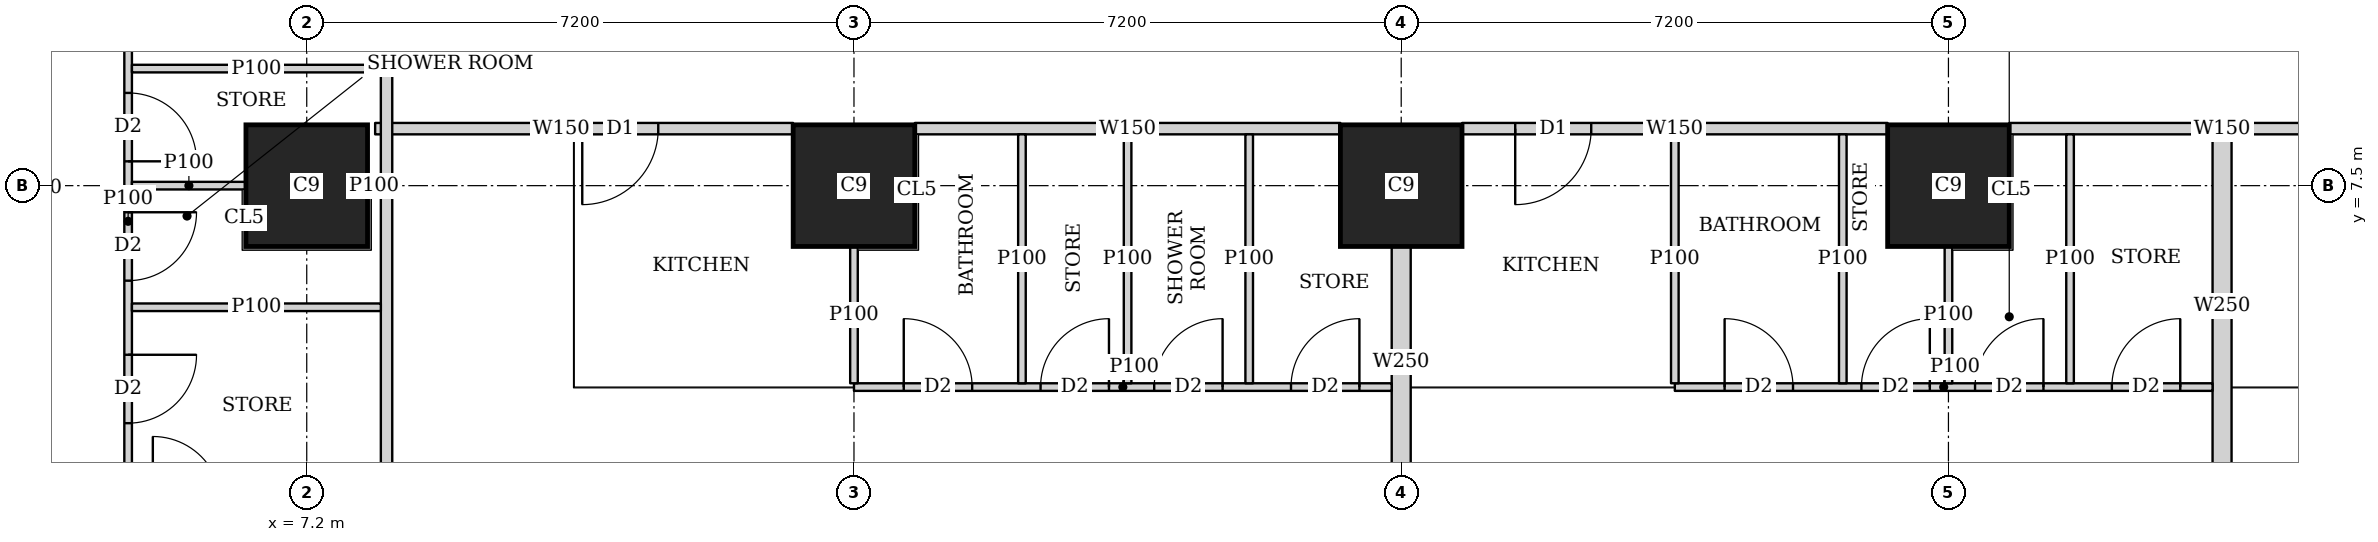
"""IFC4 building model, lengths in metres.
Left out: names, types, materials, properties, quantities, classifications, styles, units other than length and angle.
Written with IfcOpenShell. Run it as: python <this file> out.ifc"""

import sys

from ifc_helpers import new_model, si_unit, direction, frame, frame_2d, origin, origin_2d, place, context, subcontext, project, spatial, rectangle, extrude, element, fill, save


model = new_model("IFC4")
c1 = context("Model", 3, precision=1e-05, world=origin(), true_north=direction((0.0, 1.0)))
c2 = subcontext(c1, "Body", "Model", "MODEL_VIEW")
j1 = project(units=[si_unit("LENGTHUNIT", "METRE"), si_unit("PLANEANGLEUNIT", "RADIAN")], contexts=[c1])
p1 = place(None, origin())
s1 = spatial("IfcSite", under=j1, at=p1, CompositionType="ELEMENT")
p2 = place(p1, origin())
s2 = spatial("IfcBuilding", under=s1, at=p2, CompositionType="ELEMENT")
p3 = place(p2, frame((0.0, 0.0, 100.4)))
s3 = spatial("IfcBuildingStorey", under=s2, at=p3, CompositionType="ELEMENT", Elevation=100.4)
for number, where, z_axis, x_axis in (
    (1, (7.2, 7.5, 0.0), (0.0, 0.0, 1.0), (1.0, 0.0, 0.0)),
    (2, (14.4, 7.5, 0.0), (0.0, 0.0, 1.0), (1.0, 0.0, 0.0)),
    (3, (21.6, 7.5, 0.0), (0.0, 0.0, 1.0), (1.0, 0.0, 0.0)),
    (4, (28.8, 7.5, 0.0), (0.0, 0.0, 1.0), (1.0, 0.0, 0.0)),
):
    element("IfcColumn", number, at=place(p3, frame(where, z_axis=z_axis, x_axis=x_axis)), inside=s3, PredefinedType="COLUMN", context=c2, shape_type="SweptSolid", body=[
        extrude(rectangle(XDim=1.6, YDim=1.6, at=origin_2d()), origin(), (0.0, 0.0, 1.0), 3.75),
    ])
p4 = place(p3, frame((8.25, 2.126, 0.0), z_axis=(0.0, 0.0, 1.0), x_axis=(0.0, 1.0, 0.0)))
e5 = element("IfcWall", 5, at=p4, inside=s3, PredefinedType="SOLIDWALL", context=c2, shape_type="SweptSolid", body=[
    extrude(rectangle(XDim=40.773, YDim=0.15, at=frame_2d((20.386, 0.0))), origin(), (0.0, 0.0, 1.0), 3.5),
])
p5 = place(p4, frame((10.286, 0.0, 0.0)))
e6 = element("IfcOpeningElement", 6, at=p5, cuts=e5, PredefinedType="OPENING", context=c2, shape_type="SweptSolid", body=[
    extrude(rectangle(XDim=1.0, YDim=2.1, at=frame_2d((0.5, 1.05))), frame((0.0, 0.085, 0.0), z_axis=(0.0, -1.0, 0.0), x_axis=(1.0, 0.0, 0.0)), (0.0, 0.0, 1.0), 0.17),
])
p6 = place(p4, frame((14.461, 0.0, 0.0)))
e7 = element("IfcOpeningElement", 7, at=p6, cuts=e5, PredefinedType="OPENING", context=c2, shape_type="SweptSolid", body=[
    extrude(rectangle(XDim=1.0, YDim=2.1, at=frame_2d((0.5, 1.05))), frame((0.0, 0.085, 0.0), z_axis=(0.0, -1.0, 0.0), x_axis=(1.0, 0.0, 0.0)), (0.0, 0.0, 1.0), 0.17),
])
p7 = place(p4, frame((25.287, 0.0, 0.0)))
e8 = element("IfcOpeningElement", 8, at=p7, cuts=e5, PredefinedType="OPENING", context=c2, shape_type="SweptSolid", body=[
    extrude(rectangle(XDim=1.0, YDim=2.1, at=frame_2d((0.5, 1.05))), frame((0.0, 0.085, 0.0), z_axis=(0.0, -1.0, 0.0), x_axis=(1.0, 0.0, 0.0)), (0.0, 0.0, 1.0), 0.17),
])
p8 = place(p4, frame((32.787, 0.0, 0.0)))
e9 = element("IfcOpeningElement", 9, at=p8, cuts=e5, PredefinedType="OPENING", context=c2, shape_type="SweptSolid", body=[
    extrude(rectangle(XDim=1.0, YDim=2.1, at=frame_2d((0.5, 1.05))), frame((0.0, 0.085, 0.0), z_axis=(0.0, -1.0, 0.0), x_axis=(1.0, 0.0, 0.0)), (0.0, 0.0, 1.0), 0.17),
])
p9 = place(p3, frame((35.199, 8.25, 0.0), z_axis=(0.0, 0.0, 1.0), x_axis=(-1.0, 0.0, 0.0)))
e10 = element("IfcWall", 10, at=p9, inside=s3, PredefinedType="SOLIDWALL", context=c2, shape_type="SweptSolid", body=[
    extrude(rectangle(XDim=5.598, YDim=0.15, at=frame_2d((2.799, 0.0))), origin(), (0.0, 0.0, 1.0), 3.5),
])
p10 = place(p9, frame((0.699, 0.0, 0.0)))
e11 = element("IfcOpeningElement", 11, at=p10, cuts=e10, PredefinedType="OPENING", context=c2, shape_type="SweptSolid", body=[
    extrude(rectangle(XDim=1.0, YDim=2.1, at=frame_2d((0.5, 1.05))), frame((0.0, 0.085, 0.0), z_axis=(0.0, -1.0, 0.0), x_axis=(1.0, 0.0, 0.0)), (0.0, 0.0, 1.0), 0.17),
])
p11 = place(p3, frame((27.999, 8.25, 0.0), z_axis=(0.0, 0.0, 1.0), x_axis=(-1.0, 0.0, 0.0)))
e12 = element("IfcWall", 12, at=p11, inside=s3, PredefinedType="SOLIDWALL", context=c2, shape_type="SweptSolid", body=[
    extrude(rectangle(XDim=5.598, YDim=0.15, at=frame_2d((2.799, 0.0))), origin(), (0.0, 0.0, 1.0), 3.5),
])
p12 = place(p11, frame((3.899, 0.0, 0.0)))
e13 = element("IfcOpeningElement", 13, at=p12, cuts=e12, PredefinedType="OPENING", context=c2, shape_type="SweptSolid", body=[
    extrude(rectangle(XDim=1.0, YDim=2.1, at=frame_2d((0.5, 1.05))), frame((0.0, 0.085, 0.0), z_axis=(0.0, -1.0, 0.0), x_axis=(1.0, 0.0, 0.0)), (0.0, 0.0, 1.0), 0.17),
])
p13 = place(p3, frame((20.799, 8.25, 0.0), z_axis=(0.0, 0.0, 1.0), x_axis=(-1.0, 0.0, 0.0)))
e14 = element("IfcWall", 14, at=p13, inside=s3, PredefinedType="SOLIDWALL", context=c2, shape_type="SweptSolid", body=[
    extrude(rectangle(XDim=5.598, YDim=0.15, at=frame_2d((2.799, 0.0))), origin(), (0.0, 0.0, 1.0), 3.5),
])
p14 = place(p3, frame((13.599, 8.25, 0.0), z_axis=(0.0, 0.0, 1.0), x_axis=(-1.0, 0.0, 0.0)))
e15 = element("IfcWall", 15, at=p14, inside=s3, PredefinedType="SOLIDWALL", context=c2, shape_type="SweptSolid", body=[
    extrude(rectangle(XDim=5.499, YDim=0.15, at=frame_2d((2.75, 0.0))), origin(), (0.0, 0.0, 1.0), 3.5),
])
p15 = place(p14, frame((1.774, 0.0, 0.0)))
e16 = element("IfcOpeningElement", 16, at=p15, cuts=e15, PredefinedType="OPENING", context=c2, shape_type="SweptSolid", body=[
    extrude(rectangle(XDim=1.0, YDim=2.1, at=frame_2d((0.5, 1.05))), frame((0.0, 0.085, 0.0), z_axis=(0.0, -1.0, 0.0), x_axis=(1.0, 0.0, 0.0)), (0.0, 0.0, 1.0), 0.17),
])
p16 = place(p3, frame((33.382, 45.65, 0.0), z_axis=(0.0, 0.0, 1.0), x_axis=(0.185593544777, -0.982626600565, 0.0)))
e17 = element("IfcWall", 17, at=p16, inside=s3, PredefinedType="SOLIDWALL", context=c2, shape_type="SweptSolid", body=[
    extrude(rectangle(XDim=47.118, YDim=0.15, at=frame_2d((23.559, 0.0))), origin(), (0.0, 0.0, 1.0), 2.2),
])
p17 = place(p16, frame((10.662, 0.0, 0.0)))
e18 = element("IfcOpeningElement", 18, at=p17, cuts=e17, PredefinedType="OPENING", context=c2, shape_type="SweptSolid", body=[
    extrude(rectangle(XDim=1.0, YDim=2.1, at=frame_2d((0.5, 1.05))), frame((0.0, 0.085, 0.0), z_axis=(0.0, -1.0, 0.0), x_axis=(1.0, 0.0, 0.0)), (0.0, 0.0, 1.0), 0.17),
])
p18 = place(p16, frame((15.237, 0.0, 0.0)))
e19 = element("IfcOpeningElement", 19, at=p18, cuts=e17, PredefinedType="OPENING", context=c2, shape_type="SweptSolid", body=[
    extrude(rectangle(XDim=1.0, YDim=2.1, at=frame_2d((0.5, 1.05))), frame((0.0, 0.085, 0.0), z_axis=(0.0, -1.0, 0.0), x_axis=(1.0, 0.0, 0.0)), (0.0, 0.0, 1.0), 0.17),
])
p19 = place(p16, frame((27.341, 0.0, 0.0)))
e20 = element("IfcOpeningElement", 20, at=p19, cuts=e17, PredefinedType="OPENING", context=c2, shape_type="SweptSolid", body=[
    extrude(rectangle(XDim=1.0, YDim=2.1, at=frame_2d((0.5, 1.05))), frame((0.0, 0.085, 0.0), z_axis=(0.0, -1.0, 0.0), x_axis=(1.0, 0.0, 0.0)), (0.0, 0.0, 1.0), 0.17),
])
p20 = place(p16, frame((33.833, 0.0, 0.0)))
e21 = element("IfcOpeningElement", 21, at=p20, cuts=e17, PredefinedType="OPENING", context=c2, shape_type="SweptSolid", body=[
    extrude(rectangle(XDim=1.0, YDim=2.1, at=frame_2d((0.5, 1.05))), frame((0.0, 0.085, 0.0), z_axis=(0.0, -1.0, 0.0), x_axis=(1.0, 0.0, 0.0)), (0.0, 0.0, 1.0), 0.17),
])
p21 = place(p3, frame((4.85, 2.812, 0.0), z_axis=(0.0, 0.0, 1.0), x_axis=(0.0, 1.0, 0.0)))
e22 = element("IfcWall", 22, at=p21, inside=s3, PredefinedType="PARTITIONING", context=c2, shape_type="SweptSolid", body=[
    extrude(rectangle(XDim=8.438, YDim=0.1, at=frame_2d((4.219, 0.0))), origin(), (0.0, 0.0, 1.0), 3.5),
])
p22 = place(p21, frame((6.883, 0.0, 0.0)))
e23 = element("IfcOpeningElement", 23, at=p22, cuts=e22, PredefinedType="OPENING", context=c2, shape_type="SweptSolid", body=[
    extrude(rectangle(XDim=0.9, YDim=2.1, at=frame_2d((0.45, 1.05))), frame((0.0, 0.06, 0.0), z_axis=(0.0, -1.0, 0.0), x_axis=(1.0, 0.0, 0.0)), (0.0, 0.0, 1.0), 0.12),
])
p23 = place(p21, frame((3.438, 0.0, 0.0)))
e24 = element("IfcOpeningElement", 24, at=p23, cuts=e22, PredefinedType="OPENING", context=c2, shape_type="SweptSolid", body=[
    extrude(rectangle(XDim=0.9, YDim=2.1, at=frame_2d((0.45, 1.05))), frame((0.0, 0.06, 0.0), z_axis=(0.0, -1.0, 0.0), x_axis=(1.0, 0.0, 0.0)), (0.0, 0.0, 1.0), 0.12),
])
p24 = place(p21, frame((5.008, 0.0, 0.0)))
e25 = element("IfcOpeningElement", 25, at=p24, cuts=e22, PredefinedType="OPENING", context=c2, shape_type="SweptSolid", body=[
    extrude(rectangle(XDim=0.9, YDim=2.1, at=frame_2d((0.45, 1.05))), frame((0.0, 0.06, 0.0), z_axis=(0.0, -1.0, 0.0), x_axis=(1.0, 0.0, 0.0)), (0.0, 0.0, 1.0), 0.12),
])
p25 = place(p21, frame((1.563, 0.0, 0.0)))
e26 = element("IfcOpeningElement", 26, at=p25, cuts=e22, PredefinedType="OPENING", context=c2, shape_type="SweptSolid", body=[
    extrude(rectangle(XDim=0.9, YDim=2.1, at=frame_2d((0.45, 1.05))), frame((0.0, 0.06, 0.0), z_axis=(0.0, -1.0, 0.0), x_axis=(1.0, 0.0, 0.0)), (0.0, 0.0, 1.0), 0.12),
])
p26 = place(p3, frame((4.9, 7.5, 0.0), z_axis=(0.0, 0.0, 1.0), x_axis=(1.0, 0.0, 0.0)))
e27 = element("IfcWall", 27, at=p26, inside=s3, PredefinedType="PARTITIONING", context=c2, shape_type="SweptSolid", body=[
    extrude(rectangle(XDim=1.499, YDim=0.1, at=frame_2d((0.75, 0.0))), origin(), (0.0, 0.0, 1.0), 3.5),
])
p27 = place(p3, frame((8.001, 7.5, 0.0), z_axis=(0.0, 0.0, 1.0), x_axis=(1.0, 0.0, 0.0)))
e28 = element("IfcWall", 28, at=p27, inside=s3, PredefinedType="PARTITIONING", context=c2, shape_type="SweptSolid", body=[
    extrude(rectangle(XDim=0.174, YDim=0.1, at=frame_2d((0.087, 0.0))), origin(), (0.0, 0.0, 1.0), 3.5),
])
for number, where, z_axis, x_axis in (
    (29, (4.9, 9.04, 0.0), (0.0, 0.0, 1.0), (1.0, 0.0, 0.0)),
    (30, (4.9, 5.9, 0.0), (0.0, 0.0, 1.0), (1.0, 0.0, 0.0)),
):
    element("IfcWall", number, at=place(p3, frame(where, z_axis=z_axis, x_axis=x_axis)), inside=s3, PredefinedType="PARTITIONING", context=c2, shape_type="SweptSolid", body=[
        extrude(rectangle(XDim=3.275, YDim=0.1, at=frame_2d((1.638, 0.0))), origin(), (0.0, 0.0, 1.0), 3.5),
    ])
p28 = place(p3, frame((21.475, 4.85, 0.0), z_axis=(0.0, 0.0, 1.0), x_axis=(-1.0, 0.0, 0.0)))
e31 = element("IfcWall", 31, at=p28, inside=s3, PredefinedType="PARTITIONING", context=c2, shape_type="SweptSolid", body=[
    extrude(rectangle(XDim=7.075, YDim=0.1, at=frame_2d((3.538, 0.0))), origin(), (0.0, 0.0, 1.0), 3.5),
])
p29 = place(p28, frame((5.52, 0.0, 0.0)))
e32 = element("IfcOpeningElement", 32, at=p29, cuts=e31, PredefinedType="OPENING", context=c2, shape_type="SweptSolid", body=[
    extrude(rectangle(XDim=0.9, YDim=2.1, at=frame_2d((0.45, 1.05))), frame((0.0, 0.06, 0.0), z_axis=(0.0, -1.0, 0.0), x_axis=(1.0, 0.0, 0.0)), (0.0, 0.0, 1.0), 0.12),
])
p30 = place(p28, frame((2.225, 0.0, 0.0)))
e33 = element("IfcOpeningElement", 33, at=p30, cuts=e31, PredefinedType="OPENING", context=c2, shape_type="SweptSolid", body=[
    extrude(rectangle(XDim=0.9, YDim=2.1, at=frame_2d((0.45, 1.05))), frame((0.0, 0.06, 0.0), z_axis=(0.0, -1.0, 0.0), x_axis=(1.0, 0.0, 0.0)), (0.0, 0.0, 1.0), 0.12),
])
p31 = place(p28, frame((3.72, 0.0, 0.0)))
e34 = element("IfcOpeningElement", 34, at=p31, cuts=e31, PredefinedType="OPENING", context=c2, shape_type="SweptSolid", body=[
    extrude(rectangle(XDim=0.9, YDim=2.1, at=frame_2d((0.45, 1.05))), frame((0.0, 0.06, 0.0), z_axis=(0.0, -1.0, 0.0), x_axis=(1.0, 0.0, 0.0)), (0.0, 0.0, 1.0), 0.12),
])
p32 = place(p28, frame((0.425, 0.0, 0.0)))
e35 = element("IfcOpeningElement", 35, at=p32, cuts=e31, PredefinedType="OPENING", context=c2, shape_type="SweptSolid", body=[
    extrude(rectangle(XDim=0.9, YDim=2.1, at=frame_2d((0.45, 1.05))), frame((0.0, 0.06, 0.0), z_axis=(0.0, -1.0, 0.0), x_axis=(1.0, 0.0, 0.0)), (0.0, 0.0, 1.0), 0.12),
])
p33 = place(p3, frame((14.4, 4.9, 0.0), z_axis=(0.0, 0.0, 1.0), x_axis=(0.0, 1.0, 0.0)))
e36 = element("IfcWall", 36, at=p33, inside=s3, PredefinedType="PARTITIONING", context=c2, shape_type="SweptSolid", body=[
    extrude(rectangle(XDim=1.799, YDim=0.1, at=frame_2d((0.899, 0.0))), origin(), (0.0, 0.0, 1.0), 3.5),
])
for number, where, z_axis, x_axis in (
    (37, (18.0, 4.9, 0.0), (0.0, 0.0, 1.0), (0.0, 1.0, 0.0)),
    (38, (16.61, 4.9, 0.0), (0.0, 0.0, 1.0), (0.0, 1.0, 0.0)),
    (39, (19.6, 4.9, 0.0), (0.0, 0.0, 1.0), (0.0, 1.0, 0.0)),
):
    element("IfcWall", number, at=place(p3, frame(where, z_axis=z_axis, x_axis=x_axis)), inside=s3, PredefinedType="PARTITIONING", context=c2, shape_type="SweptSolid", body=[
        extrude(rectangle(XDim=3.275, YDim=0.1, at=frame_2d((1.638, 0.0))), origin(), (0.0, 0.0, 1.0), 3.5),
    ])
p34 = place(p3, frame((32.275, 4.85, 0.0), z_axis=(0.0, 0.0, 1.0), x_axis=(-1.0, 0.0, 0.0)))
e40 = element("IfcWall", 40, at=p34, inside=s3, PredefinedType="PARTITIONING", context=c2, shape_type="SweptSolid", body=[
    extrude(rectangle(XDim=7.075, YDim=0.1, at=frame_2d((3.538, 0.0))), origin(), (0.0, 0.0, 1.0), 3.5),
])
p35 = place(p34, frame((5.52, 0.0, 0.0)))
e41 = element("IfcOpeningElement", 41, at=p35, cuts=e40, PredefinedType="OPENING", context=c2, shape_type="SweptSolid", body=[
    extrude(rectangle(XDim=0.9, YDim=2.1, at=frame_2d((0.45, 1.05))), frame((0.0, 0.06, 0.0), z_axis=(0.0, -1.0, 0.0), x_axis=(1.0, 0.0, 0.0)), (0.0, 0.0, 1.0), 0.12),
])
p36 = place(p34, frame((2.225, 0.0, 0.0)))
e42 = element("IfcOpeningElement", 42, at=p36, cuts=e40, PredefinedType="OPENING", context=c2, shape_type="SweptSolid", body=[
    extrude(rectangle(XDim=0.9, YDim=2.1, at=frame_2d((0.45, 1.05))), frame((0.0, 0.06, 0.0), z_axis=(0.0, -1.0, 0.0), x_axis=(1.0, 0.0, 0.0)), (0.0, 0.0, 1.0), 0.12),
])
p37 = place(p34, frame((3.72, 0.0, 0.0)))
e43 = element("IfcOpeningElement", 43, at=p37, cuts=e40, PredefinedType="OPENING", context=c2, shape_type="SweptSolid", body=[
    extrude(rectangle(XDim=0.9, YDim=2.1, at=frame_2d((0.45, 1.05))), frame((0.0, 0.06, 0.0), z_axis=(0.0, -1.0, 0.0), x_axis=(1.0, 0.0, 0.0)), (0.0, 0.0, 1.0), 0.12),
])
p38 = place(p34, frame((0.425, 0.0, 0.0)))
e44 = element("IfcOpeningElement", 44, at=p38, cuts=e40, PredefinedType="OPENING", context=c2, shape_type="SweptSolid", body=[
    extrude(rectangle(XDim=0.9, YDim=2.1, at=frame_2d((0.45, 1.05))), frame((0.0, 0.06, 0.0), z_axis=(0.0, -1.0, 0.0), x_axis=(1.0, 0.0, 0.0)), (0.0, 0.0, 1.0), 0.12),
])
p39 = place(p3, frame((25.2, 4.9, 0.0), z_axis=(0.0, 0.0, 1.0), x_axis=(0.0, 1.0, 0.0)))
e45 = element("IfcWall", 45, at=p39, inside=s3, PredefinedType="PARTITIONING", context=c2, shape_type="SweptSolid", body=[
    extrude(rectangle(XDim=3.275, YDim=0.1, at=frame_2d((1.638, 0.0))), origin(), (0.0, 0.0, 1.0), 3.5),
])
p40 = place(p3, frame((28.8, 4.9, 0.0), z_axis=(0.0, 0.0, 1.0), x_axis=(0.0, 1.0, 0.0)))
e46 = element("IfcWall", 46, at=p40, inside=s3, PredefinedType="PARTITIONING", context=c2, shape_type="SweptSolid", body=[
    extrude(rectangle(XDim=1.799, YDim=0.1, at=frame_2d((0.899, 0.0))), origin(), (0.0, 0.0, 1.0), 3.5),
])
for number, where, z_axis, x_axis in (
    (47, (27.41, 4.9, 0.0), (0.0, 0.0, 1.0), (0.0, 1.0, 0.0)),
    (48, (30.4, 4.9, 0.0), (0.0, 0.0, 1.0), (0.0, 1.0, 0.0)),
):
    element("IfcWall", number, at=place(p3, frame(where, z_axis=z_axis, x_axis=x_axis)), inside=s3, PredefinedType="PARTITIONING", context=c2, shape_type="SweptSolid", body=[
        extrude(rectangle(XDim=3.275, YDim=0.1, at=frame_2d((1.638, 0.0))), origin(), (0.0, 0.0, 1.0), 3.5),
    ])
p41 = place(p3, frame((21.6, 3.65, 0.0), z_axis=(0.0, 0.0, 1.0), x_axis=(0.0, 1.0, 0.0)))
e49 = element("IfcWall", 49, at=p41, inside=s3, PredefinedType="SOLIDWALL", context=c2, shape_type="SweptSolid", body=[
    extrude(rectangle(XDim=3.049, YDim=0.25, at=frame_2d((1.524, 0.0))), origin(), (0.0, 0.0, 1.0), 3.5),
])
p42 = place(p3, frame((32.4, 3.65, 0.0), z_axis=(0.0, 0.0, 1.0), x_axis=(0.0, 1.0, 0.0)))
e50 = element("IfcWall", 50, at=p42, inside=s3, PredefinedType="SOLIDWALL", context=c2, shape_type="SweptSolid", body=[
    extrude(rectangle(XDim=4.525, YDim=0.25, at=frame_2d((2.263, 0.0))), origin(), (0.0, 0.0, 1.0), 3.5),
])
p43 = place(p23, origin())
e51 = element("IfcDoor", 51, at=p43, inside=s3, OperationType="SINGLE_SWING_LEFT", PredefinedType="DOOR", context=c2, shape_type="SweptSolid", body=[
    extrude(rectangle(XDim=0.9, YDim=2.1, at=frame_2d((0.45, 1.05))), frame((0.0, 0.025, 0.0), z_axis=(0.0, -1.0, 0.0), x_axis=(1.0, 0.0, 0.0)), (0.0, 0.0, 1.0), 0.05),
])
fill(e24, e51)
p44 = place(p24, origin())
e52 = element("IfcDoor", 52, at=p44, inside=s3, OperationType="SINGLE_SWING_RIGHT", PredefinedType="DOOR", context=c2, shape_type="SweptSolid", body=[
    extrude(rectangle(XDim=0.9, YDim=2.1, at=frame_2d((0.45, 1.05))), frame((0.0, 0.025, 0.0), z_axis=(0.0, -1.0, 0.0), x_axis=(1.0, 0.0, 0.0)), (0.0, 0.0, 1.0), 0.05),
])
fill(e25, e52)
p45 = place(p25, origin())
e53 = element("IfcDoor", 53, at=p45, inside=s3, OperationType="SINGLE_SWING_LEFT", PredefinedType="DOOR", context=c2, shape_type="SweptSolid", body=[
    extrude(rectangle(XDim=0.9, YDim=2.1, at=frame_2d((0.45, 1.05))), frame((0.0, 0.025, 0.0), z_axis=(0.0, -1.0, 0.0), x_axis=(1.0, 0.0, 0.0)), (0.0, 0.0, 1.0), 0.05),
])
fill(e26, e53)
p46 = place(p29, origin())
e54 = element("IfcDoor", 54, at=p46, inside=s3, OperationType="SINGLE_SWING_LEFT", PredefinedType="DOOR", context=c2, shape_type="SweptSolid", body=[
    extrude(rectangle(XDim=0.9, YDim=2.1, at=frame_2d((0.45, 1.05))), frame((0.0, 0.025, 0.0), z_axis=(0.0, -1.0, 0.0), x_axis=(1.0, 0.0, 0.0)), (0.0, 0.0, 1.0), 0.05),
])
fill(e32, e54)
p47 = place(p30, origin())
e55 = element("IfcDoor", 55, at=p47, inside=s3, OperationType="SINGLE_SWING_RIGHT", PredefinedType="DOOR", context=c2, shape_type="SweptSolid", body=[
    extrude(rectangle(XDim=0.9, YDim=2.1, at=frame_2d((0.45, 1.05))), frame((0.0, 0.025, 0.0), z_axis=(0.0, -1.0, 0.0), x_axis=(1.0, 0.0, 0.0)), (0.0, 0.0, 1.0), 0.05),
])
fill(e33, e55)
p48 = place(p31, origin())
e56 = element("IfcDoor", 56, at=p48, inside=s3, OperationType="SINGLE_SWING_RIGHT", PredefinedType="DOOR", context=c2, shape_type="SweptSolid", body=[
    extrude(rectangle(XDim=0.9, YDim=2.1, at=frame_2d((0.45, 1.05))), frame((0.0, 0.025, 0.0), z_axis=(0.0, -1.0, 0.0), x_axis=(1.0, 0.0, 0.0)), (0.0, 0.0, 1.0), 0.05),
])
fill(e34, e56)
p49 = place(p32, origin())
e57 = element("IfcDoor", 57, at=p49, inside=s3, OperationType="SINGLE_SWING_RIGHT", PredefinedType="DOOR", context=c2, shape_type="SweptSolid", body=[
    extrude(rectangle(XDim=0.9, YDim=2.1, at=frame_2d((0.45, 1.05))), frame((0.0, 0.025, 0.0), z_axis=(0.0, -1.0, 0.0), x_axis=(1.0, 0.0, 0.0)), (0.0, 0.0, 1.0), 0.05),
])
fill(e35, e57)
p50 = place(p15, origin())
e58 = element("IfcDoor", 58, at=p50, inside=s3, OperationType="SINGLE_SWING_RIGHT", PredefinedType="DOOR", context=c2, shape_type="SweptSolid", body=[
    extrude(rectangle(XDim=1.0, YDim=2.1, at=frame_2d((0.5, 1.05))), frame((0.0, 0.025, 0.0), z_axis=(0.0, -1.0, 0.0), x_axis=(1.0, 0.0, 0.0)), (0.0, 0.0, 1.0), 0.05),
])
fill(e16, e58)
p51 = place(p35, origin())
e59 = element("IfcDoor", 59, at=p51, inside=s3, OperationType="SINGLE_SWING_LEFT", PredefinedType="DOOR", context=c2, shape_type="SweptSolid", body=[
    extrude(rectangle(XDim=0.9, YDim=2.1, at=frame_2d((0.45, 1.05))), frame((0.0, 0.025, 0.0), z_axis=(0.0, -1.0, 0.0), x_axis=(1.0, 0.0, 0.0)), (0.0, 0.0, 1.0), 0.05),
])
fill(e41, e59)
p52 = place(p36, origin())
e60 = element("IfcDoor", 60, at=p52, inside=s3, OperationType="SINGLE_SWING_RIGHT", PredefinedType="DOOR", context=c2, shape_type="SweptSolid", body=[
    extrude(rectangle(XDim=0.9, YDim=2.1, at=frame_2d((0.45, 1.05))), frame((0.0, 0.025, 0.0), z_axis=(0.0, -1.0, 0.0), x_axis=(1.0, 0.0, 0.0)), (0.0, 0.0, 1.0), 0.05),
])
fill(e42, e60)
p53 = place(p37, origin())
e61 = element("IfcDoor", 61, at=p53, inside=s3, OperationType="SINGLE_SWING_RIGHT", PredefinedType="DOOR", context=c2, shape_type="SweptSolid", body=[
    extrude(rectangle(XDim=0.9, YDim=2.1, at=frame_2d((0.45, 1.05))), frame((0.0, 0.025, 0.0), z_axis=(0.0, -1.0, 0.0), x_axis=(1.0, 0.0, 0.0)), (0.0, 0.0, 1.0), 0.05),
])
fill(e43, e61)
p54 = place(p38, origin())
e62 = element("IfcDoor", 62, at=p54, inside=s3, OperationType="SINGLE_SWING_RIGHT", PredefinedType="DOOR", context=c2, shape_type="SweptSolid", body=[
    extrude(rectangle(XDim=0.9, YDim=2.1, at=frame_2d((0.45, 1.05))), frame((0.0, 0.025, 0.0), z_axis=(0.0, -1.0, 0.0), x_axis=(1.0, 0.0, 0.0)), (0.0, 0.0, 1.0), 0.05),
])
fill(e44, e62)
p55 = place(p12, origin())
e63 = element("IfcDoor", 63, at=p55, inside=s3, OperationType="SINGLE_SWING_RIGHT", PredefinedType="DOOR", context=c2, shape_type="SweptSolid", body=[
    extrude(rectangle(XDim=1.0, YDim=2.1, at=frame_2d((0.5, 1.05))), frame((0.0, 0.025, 0.0), z_axis=(0.0, -1.0, 0.0), x_axis=(1.0, 0.0, 0.0)), (0.0, 0.0, 1.0), 0.05),
])
fill(e13, e63)
save(model, sys.argv[1])
